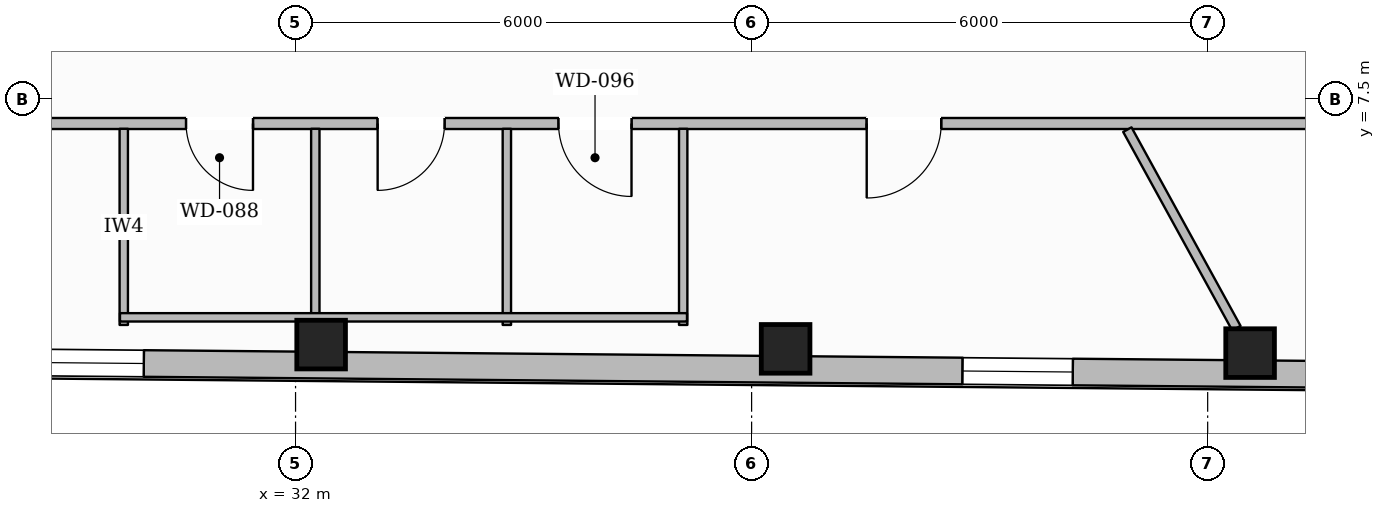
"""IFC4 building model, lengths in metres.
Left out: names, types, materials, properties, quantities, classifications, styles, units other than length and angle.
Written with IfcOpenShell. Run it as: python <this file> out.ifc"""

import sys

from ifc_helpers import new_model, si_unit, direction, frame, frame_2d, origin, origin_2d, place, context, subcontext, project, spatial, rectangle, hollow_rectangle, extrude, element, fill, save


model = new_model("IFC4")
c1 = context("Model", 3, precision=1e-05, world=origin(), true_north=direction((0.0, 1.0)))
c2 = subcontext(c1, "Body", "Model", "MODEL_VIEW")
j1 = project(units=[si_unit("LENGTHUNIT", "METRE"), si_unit("PLANEANGLEUNIT", "RADIAN")], contexts=[c1])
p1 = place(None, origin())
s1 = spatial("IfcSite", under=j1, at=p1, CompositionType="ELEMENT")
p2 = place(p1, origin())
s2 = spatial("IfcBuilding", under=s1, at=p2, CompositionType="ELEMENT")
p3 = place(p2, frame((0.0, 0.0, 188.1)))
s3 = spatial("IfcBuildingStorey", under=s2, at=p3, CompositionType="ELEMENT", Elevation=188.1)
for number, where, z_axis, x_axis in (
    (1, (32.336, 4.271, 0.0), (0.0, 0.0, 1.0), (1.0, 0.0, 0.0)),
    (2, (38.448, 4.215, 0.0), (0.0, 0.0, 1.0), (1.0, 0.0, 0.0)),
    (3, (44.558, 4.159, 0.0), (0.0, 0.0, 1.0), (1.0, 0.0, 0.0)),
):
    element("IfcColumn", number, at=place(p3, frame(where, z_axis=z_axis, x_axis=x_axis)), inside=s3, PredefinedType="COLUMN", context=c2, shape_type="SweptSolid", body=[
        extrude(hollow_rectangle(XDim=0.64, YDim=0.64, WallThickness=0.028, at=origin_2d()), origin(), (0.0, 0.0, 1.0), 3.6),
    ])
p4 = place(p3, frame((57.259, 3.773, 0.0), z_axis=(0.0, 0.0, 1.0), x_axis=(-0.999958016909, 0.009163210113, 0.0)))
e4 = element("IfcWall", 4, at=p4, inside=s3, PredefinedType="STANDARD", context=c2, shape_type="SweptSolid", body=[
    extrude(rectangle(XDim=37.621, YDim=0.35, at=frame_2d((18.81, 0.0))), origin(), (0.0, 0.0, 1.0), 3.132),
])
p5 = place(p4, frame((33.368, 0.0, 0.65)))
e5 = element("IfcOpeningElement", 5, at=p5, cuts=e4, PredefinedType="OPENING", context=c2, shape_type="SweptSolid", body=[
    extrude(rectangle(XDim=1.45, YDim=1.75, at=frame_2d((0.725, 0.875))), frame((0.0, 0.185, 0.0), z_axis=(0.0, -1.0, 0.0), x_axis=(1.0, 0.0, 0.0)), (0.0, 0.0, 1.0), 0.37),
])
p6 = place(p4, frame((27.257, 0.0, 0.65)))
e6 = element("IfcOpeningElement", 6, at=p6, cuts=e4, PredefinedType="OPENING", context=c2, shape_type="SweptSolid", body=[
    extrude(rectangle(XDim=1.45, YDim=1.75, at=frame_2d((0.725, 0.875))), frame((0.0, 0.185, 0.0), z_axis=(0.0, -1.0, 0.0), x_axis=(1.0, 0.0, 0.0)), (0.0, 0.0, 1.0), 0.37),
])
p7 = place(p4, frame((15.034, 0.0, 0.65)))
e7 = element("IfcOpeningElement", 7, at=p7, cuts=e4, PredefinedType="OPENING", context=c2, shape_type="SweptSolid", body=[
    extrude(rectangle(XDim=1.45, YDim=1.75, at=frame_2d((0.725, 0.875))), frame((0.0, 0.185, 0.0), z_axis=(0.0, -1.0, 0.0), x_axis=(1.0, 0.0, 0.0)), (0.0, 0.0, 1.0), 0.37),
])
p8 = place(p4, frame((8.923, 0.0, 0.65)))
e8 = element("IfcOpeningElement", 8, at=p8, cuts=e4, PredefinedType="OPENING", context=c2, shape_type="SweptSolid", body=[
    extrude(rectangle(XDim=1.45, YDim=1.75, at=frame_2d((0.725, 0.875))), frame((0.0, 0.185, 0.0), z_axis=(0.0, -1.0, 0.0), x_axis=(1.0, 0.0, 0.0)), (0.0, 0.0, 1.0), 0.37),
])
p9 = place(p4, frame((2.812, 0.0, 0.65)))
e9 = element("IfcOpeningElement", 9, at=p9, cuts=e4, PredefinedType="OPENING", context=c2, shape_type="SweptSolid", body=[
    extrude(rectangle(XDim=1.45, YDim=1.75, at=frame_2d((0.725, 0.875))), frame((0.0, 0.185, 0.0), z_axis=(0.0, -1.0, 0.0), x_axis=(1.0, 0.0, 0.0)), (0.0, 0.0, 1.0), 0.37),
])
p10 = place(p3, frame((49.94, 7.18, 0.0), z_axis=(0.0, 0.0, 1.0), x_axis=(-1.0, 0.0, 0.0)))
e10 = element("IfcWall", 10, at=p10, inside=s3, PredefinedType="PARTITIONING", context=c2, shape_type="SweptSolid", body=[
    extrude(rectangle(XDim=23.88, YDim=0.145, at=frame_2d((11.94, 0.0))), origin(), (0.0, 0.0, 1.0), 3.6),
])
p11 = place(p10, frame((18.5, 0.0, 0.0)))
e11 = element("IfcOpeningElement", 11, at=p11, cuts=e10, PredefinedType="OPENING", context=c2, shape_type="SweptSolid", body=[
    extrude(rectangle(XDim=0.88, YDim=2.1, at=frame_2d((0.44, 1.05))), frame((0.0, 0.083, 0.0), z_axis=(0.0, -1.0, 0.0), x_axis=(1.0, 0.0, 0.0)), (0.0, 0.0, 1.0), 0.165),
])
p12 = place(p10, frame((15.98, 0.0, 0.0)))
e12 = element("IfcOpeningElement", 12, at=p12, cuts=e10, PredefinedType="OPENING", context=c2, shape_type="SweptSolid", body=[
    extrude(rectangle(XDim=0.88, YDim=2.1, at=frame_2d((0.44, 1.05))), frame((0.0, 0.083, 0.0), z_axis=(0.0, -1.0, 0.0), x_axis=(1.0, 0.0, 0.0)), (0.0, 0.0, 1.0), 0.165),
])
p13 = place(p10, frame((13.52, 0.0, 0.0)))
e13 = element("IfcOpeningElement", 13, at=p13, cuts=e10, PredefinedType="OPENING", context=c2, shape_type="SweptSolid", body=[
    extrude(rectangle(XDim=0.96, YDim=2.1, at=frame_2d((0.48, 1.05))), frame((0.0, 0.083, 0.0), z_axis=(0.0, -1.0, 0.0), x_axis=(1.0, 0.0, 0.0)), (0.0, 0.0, 1.0), 0.165),
])
p14 = place(p10, frame((9.446, 0.0, 0.0)))
e14 = element("IfcOpeningElement", 14, at=p14, cuts=e10, PredefinedType="OPENING", context=c2, shape_type="SweptSolid", body=[
    extrude(rectangle(XDim=0.98, YDim=2.15, at=frame_2d((0.49, 1.075))), frame((0.0, 0.083, 0.0), z_axis=(0.0, -1.0, 0.0), x_axis=(1.0, 0.0, 0.0)), (0.0, 0.0, 1.0), 0.165),
])
p15 = place(p3, frame((29.74, 4.53, 0.0), z_axis=(0.0, 0.0, 1.0), x_axis=(0.0, 1.0, 0.0)))
e15 = element("IfcWall", 15, at=p15, inside=s3, PredefinedType="PLUMBINGWALL", context=c2, shape_type="SweptSolid", body=[
    extrude(rectangle(XDim=2.58, YDim=0.11, at=frame_2d((1.29, 0.0))), origin(), (0.0, 0.0, 1.0), 3.6),
])
p16 = place(p3, frame((32.26, 4.53, 0.0), z_axis=(0.0, 0.0, 1.0), x_axis=(0.0, 1.0, 0.0)))
e16 = element("IfcWall", 16, at=p16, inside=s3, PredefinedType="PLUMBINGWALL", context=c2, shape_type="SweptSolid", body=[
    extrude(rectangle(XDim=2.58, YDim=0.11, at=frame_2d((1.29, 0.0))), origin(), (0.0, 0.0, 1.0), 3.141),
])
for number, where, z_axis, x_axis in (
    (17, (34.78, 4.53, 0.0), (0.0, 0.0, 1.0), (0.0, 1.0, 0.0)),
    (18, (37.1, 4.53, 0.0), (0.0, 0.0, 1.0), (0.0, 1.0, 0.0)),
):
    element("IfcWall", number, at=place(p3, frame(where, z_axis=z_axis, x_axis=x_axis)), inside=s3, PredefinedType="PLUMBINGWALL", context=c2, shape_type="SweptSolid", body=[
        extrude(rectangle(XDim=2.58, YDim=0.11, at=frame_2d((1.29, 0.0))), origin(), (0.0, 0.0, 1.0), 3.6),
    ])
p17 = place(p3, frame((29.69, 4.63, 0.0), z_axis=(0.0, 0.0, 1.0), x_axis=(1.0, 0.0, 0.0)))
e19 = element("IfcWall", 19, at=p17, inside=s3, PredefinedType="PLUMBINGWALL", context=c2, shape_type="SweptSolid", body=[
    extrude(rectangle(XDim=7.46, YDim=0.11, at=frame_2d((3.73, 0.0))), origin(), (0.0, 0.0, 1.0), 3.6),
])
p18 = place(p3, frame((42.943, 7.1, 0.0), z_axis=(0.0, 0.0, 1.0), x_axis=(0.481352610258, -0.876527047271, 0.0)))
e20 = element("IfcWall", 20, at=p18, inside=s3, PredefinedType="PARTITIONING", context=c2, shape_type="SweptSolid", body=[
    extrude(rectangle(XDim=2.98, YDim=0.125, at=frame_2d((1.49, 0.0))), origin(), (0.0, 0.0, 1.0), 3.6),
])
p19 = place(p6, origin())
e21 = element("IfcWindow", 21, at=p19, inside=s3, PartitioningType="SINGLE_PANEL", PredefinedType="WINDOW", context=c2, shape_type="SweptSolid", body=[
    extrude(rectangle(XDim=1.45, YDim=1.75, at=frame_2d((0.725, 0.875))), frame((0.0, 0.03, 0.0), z_axis=(0.0, -1.0, 0.0), x_axis=(1.0, 0.0, 0.0)), (0.0, 0.0, 1.0), 0.06),
])
fill(e6, e21)
p20 = place(p7, origin())
e22 = element("IfcWindow", 22, at=p20, inside=s3, PartitioningType="SINGLE_PANEL", PredefinedType="WINDOW", context=c2, shape_type="SweptSolid", body=[
    extrude(rectangle(XDim=1.45, YDim=1.75, at=frame_2d((0.725, 0.875))), frame((0.0, 0.03, 0.0), z_axis=(0.0, -1.0, 0.0), x_axis=(1.0, 0.0, 0.0)), (0.0, 0.0, 1.0), 0.06),
])
fill(e7, e22)
p21 = place(p11, origin())
e23 = element("IfcDoor", 23, at=p21, inside=s3, OperationType="SINGLE_SWING_LEFT", PredefinedType="DOOR", context=c2, shape_type="SweptSolid", body=[
    extrude(rectangle(XDim=0.88, YDim=2.1, at=frame_2d((0.44, 1.05))), frame((0.0, 0.025, 0.0), z_axis=(0.0, -1.0, 0.0), x_axis=(1.0, 0.0, 0.0)), (0.0, 0.0, 1.0), 0.05),
])
fill(e11, e23)
p22 = place(p12, origin())
e24 = element("IfcDoor", 24, at=p22, inside=s3, OperationType="SINGLE_SWING_RIGHT", PredefinedType="DOOR", context=c2, shape_type="SweptSolid", body=[
    extrude(rectangle(XDim=0.88, YDim=2.1, at=frame_2d((0.44, 1.05))), frame((0.0, 0.025, 0.0), z_axis=(0.0, -1.0, 0.0), x_axis=(1.0, 0.0, 0.0)), (0.0, 0.0, 1.0), 0.05),
])
fill(e12, e24)
p23 = place(p13, origin())
e25 = element("IfcDoor", 25, at=p23, inside=s3, OperationType="SINGLE_SWING_LEFT", PredefinedType="DOOR", context=c2, shape_type="SweptSolid", body=[
    extrude(rectangle(XDim=0.96, YDim=2.1, at=frame_2d((0.48, 1.05))), frame((0.0, 0.025, 0.0), z_axis=(0.0, -1.0, 0.0), x_axis=(1.0, 0.0, 0.0)), (0.0, 0.0, 1.0), 0.05),
])
fill(e13, e25)
p24 = place(p14, origin())
e26 = element("IfcDoor", 26, at=p24, inside=s3, OperationType="SINGLE_SWING_RIGHT", PredefinedType="DOOR", context=c2, shape_type="SweptSolid", body=[
    extrude(rectangle(XDim=0.98, YDim=2.15, at=frame_2d((0.49, 1.075))), frame((0.0, 0.025, 0.0), z_axis=(0.0, -1.0, 0.0), x_axis=(1.0, 0.0, 0.0)), (0.0, 0.0, 1.0), 0.05),
])
fill(e14, e26)
save(model, sys.argv[1])
